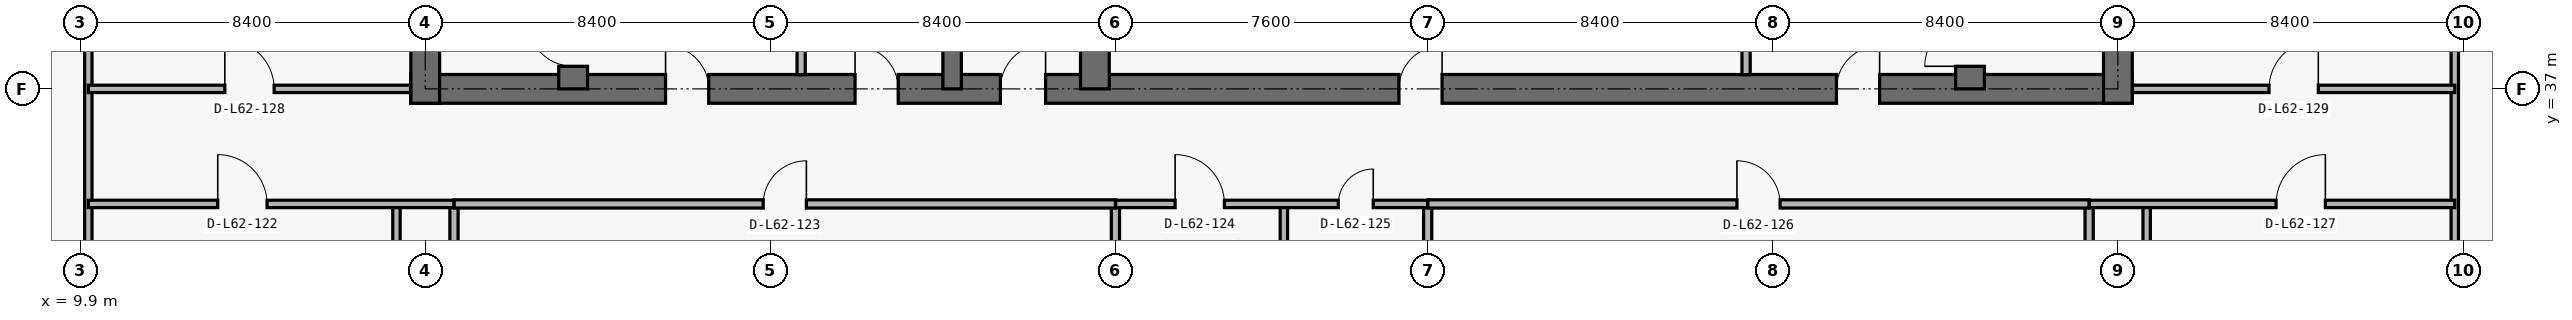
"""IFC4 building model, lengths in metres.
Left out: names, types, materials, properties, quantities, classifications, styles, units other than length and angle.
Written with IfcOpenShell. Run it as: python <this file> out.ifc"""

import sys

from ifc_helpers import new_model, si_unit, direction, frame, frame_2d, origin, place, context, subcontext, project, spatial, rectangle, extrude, element, fill, save


model = new_model("IFC4")
c1 = context("Model", 3, precision=1e-05, world=origin(), true_north=direction((0.0, 1.0)))
c2 = subcontext(c1, "Body", "Model", "MODEL_VIEW")
j1 = project(units=[si_unit("LENGTHUNIT", "METRE"), si_unit("PLANEANGLEUNIT", "RADIAN")], contexts=[c1])
p1 = place(None, origin())
s1 = spatial("IfcSite", under=j1, at=p1, CompositionType="ELEMENT")
p2 = place(p1, origin())
s2 = spatial("IfcBuilding", under=s1, at=p2, CompositionType="ELEMENT")
p3 = place(p2, frame((0.0, 0.0, 221.4)))
s3 = spatial("IfcBuildingStorey", under=s2, at=p3, CompositionType="ELEMENT", Elevation=221.4)
p4 = place(p3, frame((17.95, 37.0, 0.0), z_axis=(0.0, 0.0, 1.0), x_axis=(1.0, 0.0, 0.0)))
e1 = element("IfcWall", 1, at=p4, inside=s3, PredefinedType="SHEAR", context=c2, shape_type="SweptSolid", body=[
    extrude(rectangle(XDim=41.9, YDim=0.7, at=frame_2d((20.95, 0.0))), origin(), (0.0, 0.0, 1.0), 4.85),
])
p5 = place(p4, frame((14.35, 0.0, 0.0)))
e2 = element("IfcOpeningElement", 2, at=p5, cuts=e1, PredefinedType="OPENING", context=c2, shape_type="SweptSolid", body=[
    extrude(rectangle(XDim=1.1, YDim=2.15, at=frame_2d((0.55, 1.075))), frame((0.0, 0.36, 0.0), z_axis=(0.0, -1.0, 0.0), x_axis=(1.0, 0.0, 0.0)), (0.0, 0.0, 1.0), 0.72),
])
p6 = place(p4, frame((6.2, 0.0, 0.0)))
e3 = element("IfcOpeningElement", 3, at=p6, cuts=e1, PredefinedType="OPENING", context=c2, shape_type="SweptSolid", body=[
    extrude(rectangle(XDim=1.05, YDim=2.15, at=frame_2d((0.525, 1.075))), frame((0.0, 0.36, 0.0), z_axis=(0.0, -1.0, 0.0), x_axis=(1.0, 0.0, 0.0)), (0.0, 0.0, 1.0), 0.72),
])
p7 = place(p4, frame((34.7, 0.0, 0.0)))
e4 = element("IfcOpeningElement", 4, at=p7, cuts=e1, PredefinedType="OPENING", context=c2, shape_type="SweptSolid", body=[
    extrude(rectangle(XDim=1.05, YDim=2.15, at=frame_2d((0.525, 1.075))), frame((0.0, 0.36, 0.0), z_axis=(0.0, -1.0, 0.0), x_axis=(1.0, 0.0, 0.0)), (0.0, 0.0, 1.0), 0.72),
])
p8 = place(p4, frame((10.812, 0.0, 0.0)))
e5 = element("IfcOpeningElement", 5, at=p8, cuts=e1, PredefinedType="OPENING", context=c2, shape_type="SweptSolid", body=[
    extrude(rectangle(XDim=1.05, YDim=2.15, at=frame_2d((0.525, 1.075))), frame((0.0, 0.36, 0.0), z_axis=(0.0, -1.0, 0.0), x_axis=(1.0, 0.0, 0.0)), (0.0, 0.0, 1.0), 0.72),
])
p9 = place(p4, frame((24.05, 0.0, 0.0)))
e6 = element("IfcOpeningElement", 6, at=p9, cuts=e1, PredefinedType="OPENING", context=c2, shape_type="SweptSolid", body=[
    extrude(rectangle(XDim=1.05, YDim=2.15, at=frame_2d((0.525, 1.075))), frame((0.0, 0.36, 0.0), z_axis=(0.0, -1.0, 0.0), x_axis=(1.0, 0.0, 0.0)), (0.0, 0.0, 1.0), 0.72),
])
for number, where, z_axis, x_axis in (
    (7, (18.3, 36.65, 0.0), (0.0, 0.0, 1.0), (0.0, 1.0, 0.0)),
    (8, (59.5, 36.65, 0.0), (0.0, 0.0, 1.0), (0.0, 1.0, 0.0)),
):
    element("IfcWall", number, at=place(p3, frame(where, z_axis=z_axis, x_axis=x_axis)), inside=s3, PredefinedType="SHEAR", context=c2, shape_type="SweptSolid", body=[
        extrude(rectangle(XDim=13.95, YDim=0.7, at=frame_2d((6.975, 0.0))), origin(), (0.0, 0.0, 1.0), 4.85),
    ])
p10 = place(p3, frame((21.9, 37.0, 0.0), z_axis=(0.0, 0.0, 1.0), x_axis=(0.0, 1.0, 0.0)))
e9 = element("IfcWall", 9, at=p10, inside=s3, PredefinedType="SHEAR", context=c2, shape_type="SweptSolid", body=[
    extrude(rectangle(XDim=9.575, YDim=0.7, at=frame_2d((4.788, 0.0))), origin(), (0.0, 0.0, 1.0), 4.85),
])
p11 = place(p10, frame((0.55, 0.0, 0.0)))
e10 = element("IfcOpeningElement", 10, at=p11, cuts=e9, PredefinedType="OPENING", context=c2, shape_type="SweptSolid", body=[
    extrude(rectangle(XDim=1.1, YDim=2.15, at=frame_2d((0.55, 1.075))), frame((0.0, 0.36, 0.0), z_axis=(0.0, -1.0, 0.0), x_axis=(1.0, 0.0, 0.0)), (0.0, 0.0, 1.0), 0.72),
])
p12 = place(p3, frame((55.9, 37.0, 0.0), z_axis=(0.0, 0.0, 1.0), x_axis=(0.0, 1.0, 0.0)))
e11 = element("IfcWall", 11, at=p12, inside=s3, PredefinedType="SHEAR", context=c2, shape_type="SweptSolid", body=[
    extrude(rectangle(XDim=9.575, YDim=0.7, at=frame_2d((4.788, 0.0))), origin(), (0.0, 0.0, 1.0), 4.85),
])
p13 = place(p12, frame((0.55, 0.0, 0.0)))
e12 = element("IfcOpeningElement", 12, at=p13, cuts=e11, PredefinedType="OPENING", context=c2, shape_type="SweptSolid", body=[
    extrude(rectangle(XDim=1.1, YDim=2.15, at=frame_2d((0.55, 1.075))), frame((0.0, 0.36, 0.0), z_axis=(0.0, -1.0, 0.0), x_axis=(1.0, 0.0, 0.0)), (0.0, 0.0, 1.0), 0.72),
])
p14 = place(p3, frame((31.125, 37.0, 0.0), z_axis=(0.0, 0.0, 1.0), x_axis=(0.0, 1.0, 0.0)))
e13 = element("IfcWall", 13, at=p14, inside=s3, PredefinedType="SHEAR", context=c2, shape_type="SweptSolid", body=[
    extrude(rectangle(XDim=9.575, YDim=0.45, at=frame_2d((4.788, 0.0))), origin(), (0.0, 0.0, 1.0), 4.85),
])
p15 = place(p3, frame((34.6, 37.0, 0.0), z_axis=(0.0, 0.0, 1.0), x_axis=(0.0, 1.0, 0.0)))
e14 = element("IfcWall", 14, at=p15, inside=s3, PredefinedType="SHEAR", context=c2, shape_type="SweptSolid", body=[
    extrude(rectangle(XDim=9.575, YDim=0.7, at=frame_2d((4.788, 0.0))), origin(), (0.0, 0.0, 1.0), 4.85),
])
p16 = place(p3, frame((10.1, 12.9, 0.0), z_axis=(0.0, 0.0, 1.0), x_axis=(0.0, 1.0, 0.0)))
e15 = element("IfcWall", 15, at=p16, inside=s3, PredefinedType="PARTITIONING", context=c2, shape_type="SweptSolid", body=[
    extrude(rectangle(XDim=33.98, YDim=0.18, at=frame_2d((16.99, 0.0))), origin(), (0.0, 0.0, 1.0), 3.814),
])
p17 = place(p3, frame((17.6, 12.9, 0.0), z_axis=(0.0, 0.0, 1.0), x_axis=(0.0, 1.0, 0.0)))
e16 = element("IfcWall", 16, at=p17, inside=s3, PredefinedType="PARTITIONING", context=c2, shape_type="SweptSolid", body=[
    extrude(rectangle(XDim=21.3, YDim=0.18, at=frame_2d((10.65, 0.0))), origin(), (0.0, 0.0, 1.0), 4.85),
])
p18 = place(p3, frame((19.0, 12.9, 0.0), z_axis=(0.0, 0.0, 1.0), x_axis=(0.0, 1.0, 0.0)))
e17 = element("IfcWall", 17, at=p18, inside=s3, PredefinedType="PARTITIONING", context=c2, shape_type="SweptSolid", body=[
    extrude(rectangle(XDim=21.3, YDim=0.2, at=frame_2d((10.65, 0.0))), origin(), (0.0, 0.0, 1.0), 4.85),
])
p19 = place(p3, frame((27.45, 37.345, 0.0), z_axis=(0.0, 0.0, 1.0), x_axis=(0.0, 1.0, 0.0)))
e18 = element("IfcWall", 18, at=p19, inside=s3, PredefinedType="PARTITIONING", context=c2, shape_type="SweptSolid", body=[
    extrude(rectangle(XDim=5.385, YDim=0.2, at=frame_2d((2.692, 0.0))), origin(), (0.0, 0.0, 1.0), 4.85),
])
p20 = place(p3, frame((35.1, 12.9, 0.0), z_axis=(0.0, 0.0, 1.0), x_axis=(0.0, 1.0, 0.0)))
e19 = element("IfcWall", 19, at=p20, inside=s3, PredefinedType="PARTITIONING", context=c2, shape_type="SweptSolid", body=[
    extrude(rectangle(XDim=21.3, YDim=0.2, at=frame_2d((10.65, 0.0))), origin(), (0.0, 0.0, 1.0), 3.814),
])
p21 = place(p3, frame((39.2, 29.4, 0.0), z_axis=(0.0, 0.0, 1.0), x_axis=(0.0, 1.0, 0.0)))
e20 = element("IfcWall", 20, at=p21, inside=s3, PredefinedType="PARTITIONING", context=c2, shape_type="SweptSolid", body=[
    extrude(rectangle(XDim=4.8, YDim=0.18, at=frame_2d((2.4, 0.0))), origin(), (0.0, 0.0, 1.0), 4.85),
])
p22 = place(p3, frame((42.7, 12.9, 0.0), z_axis=(0.0, 0.0, 1.0), x_axis=(0.0, 1.0, 0.0)))
e21 = element("IfcWall", 21, at=p22, inside=s3, PredefinedType="PARTITIONING", context=c2, shape_type="SweptSolid", body=[
    extrude(rectangle(XDim=21.3, YDim=0.2, at=frame_2d((10.65, 0.0))), origin(), (0.0, 0.0, 1.0), 3.814),
])
p23 = place(p3, frame((50.45, 37.345, 0.0), z_axis=(0.0, 0.0, 1.0), x_axis=(0.0, 1.0, 0.0)))
e22 = element("IfcWall", 22, at=p23, inside=s3, PredefinedType="PARTITIONING", context=c2, shape_type="SweptSolid", body=[
    extrude(rectangle(XDim=5.385, YDim=0.2, at=frame_2d((2.692, 0.0))), origin(), (0.0, 0.0, 1.0), 4.85),
])
p24 = place(p3, frame((58.8, 12.9, 0.0), z_axis=(0.0, 0.0, 1.0), x_axis=(0.0, 1.0, 0.0)))
e23 = element("IfcWall", 23, at=p24, inside=s3, PredefinedType="PARTITIONING", context=c2, shape_type="SweptSolid", body=[
    extrude(rectangle(XDim=21.3, YDim=0.2, at=frame_2d((10.65, 0.0))), origin(), (0.0, 0.0, 1.0), 4.85),
])
p25 = place(p3, frame((60.2, 12.9, 0.0), z_axis=(0.0, 0.0, 1.0), x_axis=(0.0, 1.0, 0.0)))
e24 = element("IfcWall", 24, at=p25, inside=s3, PredefinedType="PARTITIONING", context=c2, shape_type="SweptSolid", body=[
    extrude(rectangle(XDim=21.3, YDim=0.18, at=frame_2d((10.65, 0.0))), origin(), (0.0, 0.0, 1.0), 4.85),
])
p26 = place(p3, frame((67.7, 12.9, 0.0), z_axis=(0.0, 0.0, 1.0), x_axis=(0.0, 1.0, 0.0)))
e25 = element("IfcWall", 25, at=p26, inside=s3, PredefinedType="PARTITIONING", context=c2, shape_type="SweptSolid", body=[
    extrude(rectangle(XDim=33.98, YDim=0.18, at=frame_2d((16.99, 0.0))), origin(), (0.0, 0.0, 1.0), 3.814),
])
p27 = place(p3, frame((10.1, 34.2, 0.0), z_axis=(0.0, 0.0, 1.0), x_axis=(1.0, 0.0, 0.0)))
e26 = element("IfcWall", 26, at=p27, inside=s3, PredefinedType="PARTITIONING", context=c2, shape_type="SweptSolid", body=[
    extrude(rectangle(XDim=8.9, YDim=0.18, at=frame_2d((4.45, 0.0))), origin(), (0.0, 0.0, 1.0), 4.85),
])
p28 = place(p27, frame((3.15, 0.0, 0.0)))
e27 = element("IfcOpeningElement", 27, at=p28, cuts=e26, PredefinedType="OPENING", context=c2, shape_type="SweptSolid", body=[
    extrude(rectangle(XDim=1.2, YDim=2.2, at=frame_2d((0.6, 1.1))), frame((0.0, 0.1, 0.0), z_axis=(0.0, -1.0, 0.0), x_axis=(1.0, 0.0, 0.0)), (0.0, 0.0, 1.0), 0.2),
])
p29 = place(p3, frame((19.005, 34.2, 0.0), z_axis=(0.0, 0.0, 1.0), x_axis=(1.0, 0.0, 0.0)))
e28 = element("IfcWall", 28, at=p29, inside=s3, PredefinedType="PARTITIONING", context=c2, shape_type="SweptSolid", body=[
    extrude(rectangle(XDim=16.095, YDim=0.2, at=frame_2d((8.048, 0.0))), origin(), (0.0, 0.0, 1.0), 4.85),
])
p30 = place(p29, frame((7.522, 0.0, 0.0)))
e29 = element("IfcOpeningElement", 29, at=p30, cuts=e28, PredefinedType="OPENING", context=c2, shape_type="SweptSolid", body=[
    extrude(rectangle(XDim=1.05, YDim=2.15, at=frame_2d((0.525, 1.075))), frame((0.0, 0.11, 0.0), z_axis=(0.0, -1.0, 0.0), x_axis=(1.0, 0.0, 0.0)), (0.0, 0.0, 1.0), 0.22),
])
p31 = place(p3, frame((35.105, 34.2, 0.0), z_axis=(0.0, 0.0, 1.0), x_axis=(1.0, 0.0, 0.0)))
e30 = element("IfcWall", 30, at=p31, inside=s3, PredefinedType="PARTITIONING", context=c2, shape_type="SweptSolid", body=[
    extrude(rectangle(XDim=7.595, YDim=0.18, at=frame_2d((3.797, 0.0))), origin(), (0.0, 0.0, 1.0), 4.85),
])
p32 = place(p31, frame((1.448, 0.0, 0.0)))
e31 = element("IfcOpeningElement", 31, at=p32, cuts=e30, PredefinedType="OPENING", context=c2, shape_type="SweptSolid", body=[
    extrude(rectangle(XDim=1.2, YDim=2.2, at=frame_2d((0.6, 1.1))), frame((0.0, 0.1, 0.0), z_axis=(0.0, -1.0, 0.0), x_axis=(1.0, 0.0, 0.0)), (0.0, 0.0, 1.0), 0.2),
])
p33 = place(p31, frame((5.42, 0.0, 0.0)))
e32 = element("IfcOpeningElement", 32, at=p33, cuts=e30, PredefinedType="OPENING", context=c2, shape_type="SweptSolid", body=[
    extrude(rectangle(XDim=0.85, YDim=2.1, at=frame_2d((0.425, 1.05))), frame((0.0, 0.1, 0.0), z_axis=(0.0, -1.0, 0.0), x_axis=(1.0, 0.0, 0.0)), (0.0, 0.0, 1.0), 0.2),
])
p34 = place(p3, frame((42.705, 34.2, 0.0), z_axis=(0.0, 0.0, 1.0), x_axis=(1.0, 0.0, 0.0)))
e33 = element("IfcWall", 33, at=p34, inside=s3, PredefinedType="PARTITIONING", context=c2, shape_type="SweptSolid", body=[
    extrude(rectangle(XDim=16.095, YDim=0.2, at=frame_2d((8.047, 0.0))), origin(), (0.0, 0.0, 1.0), 4.85),
])
p35 = place(p34, frame((7.522, 0.0, 0.0)))
e34 = element("IfcOpeningElement", 34, at=p35, cuts=e33, PredefinedType="OPENING", context=c2, shape_type="SweptSolid", body=[
    extrude(rectangle(XDim=1.05, YDim=2.15, at=frame_2d((0.525, 1.075))), frame((0.0, 0.11, 0.0), z_axis=(0.0, -1.0, 0.0), x_axis=(1.0, 0.0, 0.0)), (0.0, 0.0, 1.0), 0.22),
])
p36 = place(p3, frame((58.805, 34.2, 0.0), z_axis=(0.0, 0.0, 1.0), x_axis=(1.0, 0.0, 0.0)))
e35 = element("IfcWall", 35, at=p36, inside=s3, PredefinedType="PARTITIONING", context=c2, shape_type="SweptSolid", body=[
    extrude(rectangle(XDim=8.895, YDim=0.18, at=frame_2d((4.448, 0.0))), origin(), (0.0, 0.0, 1.0), 4.85),
])
p37 = place(p36, frame((4.545, 0.0, 0.0)))
e36 = element("IfcOpeningElement", 36, at=p37, cuts=e35, PredefinedType="OPENING", context=c2, shape_type="SweptSolid", body=[
    extrude(rectangle(XDim=1.2, YDim=2.2, at=frame_2d((0.6, 1.1))), frame((0.0, 0.1, 0.0), z_axis=(0.0, -1.0, 0.0), x_axis=(1.0, 0.0, 0.0)), (0.0, 0.0, 1.0), 0.2),
])
p38 = place(p3, frame((10.1, 37.0, 0.0), z_axis=(0.0, 0.0, 1.0), x_axis=(1.0, 0.0, 0.0)))
e37 = element("IfcWall", 37, at=p38, inside=s3, PredefinedType="PARTITIONING", context=c2, shape_type="SweptSolid", body=[
    extrude(rectangle(XDim=7.845, YDim=0.18, at=frame_2d((3.922, 0.0))), origin(), (0.0, 0.0, 1.0), 4.85),
])
p39 = place(p38, frame((3.323, 0.0, 0.0)))
e38 = element("IfcOpeningElement", 38, at=p39, cuts=e37, PredefinedType="OPENING", context=c2, shape_type="SweptSolid", body=[
    extrude(rectangle(XDim=1.2, YDim=2.2, at=frame_2d((0.6, 1.1))), frame((0.0, 0.1, 0.0), z_axis=(0.0, -1.0, 0.0), x_axis=(1.0, 0.0, 0.0)), (0.0, 0.0, 1.0), 0.2),
])
p40 = place(p3, frame((59.855, 37.0, 0.0), z_axis=(0.0, 0.0, 1.0), x_axis=(1.0, 0.0, 0.0)))
e39 = element("IfcWall", 39, at=p40, inside=s3, PredefinedType="PARTITIONING", context=c2, shape_type="SweptSolid", body=[
    extrude(rectangle(XDim=7.845, YDim=0.18, at=frame_2d((3.922, 0.0))), origin(), (0.0, 0.0, 1.0), 4.85),
])
p41 = place(p40, frame((3.323, 0.0, 0.0)))
e40 = element("IfcOpeningElement", 40, at=p41, cuts=e39, PredefinedType="OPENING", context=c2, shape_type="SweptSolid", body=[
    extrude(rectangle(XDim=1.2, YDim=2.2, at=frame_2d((0.6, 1.1))), frame((0.0, 0.1, 0.0), z_axis=(0.0, -1.0, 0.0), x_axis=(1.0, 0.0, 0.0)), (0.0, 0.0, 1.0), 0.2),
])
p42 = place(p5, origin())
e41 = element("IfcDoor", 41, at=p42, inside=s3, OperationType="SINGLE_SWING_RIGHT", PredefinedType="DOOR", context=c2, shape_type="SweptSolid", body=[
    extrude(rectangle(XDim=1.1, YDim=2.15, at=frame_2d((0.55, 1.075))), frame((0.0, 0.025, 0.0), z_axis=(0.0, -1.0, 0.0), x_axis=(1.0, 0.0, 0.0)), (0.0, 0.0, 1.0), 0.05),
])
fill(e2, e41)
p43 = place(p6, origin())
e42 = element("IfcDoor", 42, at=p43, inside=s3, OperationType="SINGLE_SWING_LEFT", PredefinedType="DOOR", context=c2, shape_type="SweptSolid", body=[
    extrude(rectangle(XDim=1.05, YDim=2.15, at=frame_2d((0.525, 1.075))), frame((0.0, 0.025, 0.0), z_axis=(0.0, -1.0, 0.0), x_axis=(1.0, 0.0, 0.0)), (0.0, 0.0, 1.0), 0.05),
])
fill(e3, e42)
p44 = place(p11, origin())
e43 = element("IfcDoor", 43, at=p44, inside=s3, OperationType="SINGLE_SWING_RIGHT", PredefinedType="DOOR", context=c2, shape_type="SweptSolid", body=[
    extrude(rectangle(XDim=1.1, YDim=2.15, at=frame_2d((0.55, 1.075))), frame((0.0, 0.025, 0.0), z_axis=(0.0, -1.0, 0.0), x_axis=(1.0, 0.0, 0.0)), (0.0, 0.0, 1.0), 0.05),
])
fill(e10, e43)
p45 = place(p7, origin())
e44 = element("IfcDoor", 44, at=p45, inside=s3, OperationType="SINGLE_SWING_RIGHT", PredefinedType="DOOR", context=c2, shape_type="SweptSolid", body=[
    extrude(rectangle(XDim=1.05, YDim=2.15, at=frame_2d((0.525, 1.075))), frame((0.0, 0.025, 0.0), z_axis=(0.0, -1.0, 0.0), x_axis=(1.0, 0.0, 0.0)), (0.0, 0.0, 1.0), 0.05),
])
fill(e4, e44)
p46 = place(p13, origin())
e45 = element("IfcDoor", 45, at=p46, inside=s3, OperationType="SINGLE_SWING_LEFT", PredefinedType="DOOR", context=c2, shape_type="SweptSolid", body=[
    extrude(rectangle(XDim=1.1, YDim=2.15, at=frame_2d((0.55, 1.075))), frame((0.0, 0.025, 0.0), z_axis=(0.0, -1.0, 0.0), x_axis=(1.0, 0.0, 0.0)), (0.0, 0.0, 1.0), 0.05),
])
fill(e12, e45)
p47 = place(p8, origin())
e46 = element("IfcDoor", 46, at=p47, inside=s3, OperationType="SINGLE_SWING_LEFT", PredefinedType="DOOR", context=c2, shape_type="SweptSolid", body=[
    extrude(rectangle(XDim=1.05, YDim=2.15, at=frame_2d((0.525, 1.075))), frame((0.0, 0.025, 0.0), z_axis=(0.0, -1.0, 0.0), x_axis=(1.0, 0.0, 0.0)), (0.0, 0.0, 1.0), 0.05),
])
fill(e5, e46)
p48 = place(p9, origin())
e47 = element("IfcDoor", 47, at=p48, inside=s3, OperationType="SINGLE_SWING_RIGHT", PredefinedType="DOOR", context=c2, shape_type="SweptSolid", body=[
    extrude(rectangle(XDim=1.05, YDim=2.15, at=frame_2d((0.525, 1.075))), frame((0.0, 0.025, 0.0), z_axis=(0.0, -1.0, 0.0), x_axis=(1.0, 0.0, 0.0)), (0.0, 0.0, 1.0), 0.05),
])
fill(e6, e47)
p49 = place(p28, origin())
e48 = element("IfcDoor", 48, at=p49, inside=s3, OperationType="SINGLE_SWING_LEFT", PredefinedType="DOOR", context=c2, shape_type="SweptSolid", body=[
    extrude(rectangle(XDim=1.2, YDim=2.2, at=frame_2d((0.6, 1.1))), frame((0.0, 0.025, 0.0), z_axis=(0.0, -1.0, 0.0), x_axis=(1.0, 0.0, 0.0)), (0.0, 0.0, 1.0), 0.05),
])
fill(e27, e48)
p50 = place(p30, origin())
e49 = element("IfcDoor", 49, at=p50, inside=s3, OperationType="SINGLE_SWING_RIGHT", PredefinedType="DOOR", context=c2, shape_type="SweptSolid", body=[
    extrude(rectangle(XDim=1.05, YDim=2.15, at=frame_2d((0.525, 1.075))), frame((0.0, 0.025, 0.0), z_axis=(0.0, -1.0, 0.0), x_axis=(1.0, 0.0, 0.0)), (0.0, 0.0, 1.0), 0.05),
])
fill(e29, e49)
p51 = place(p32, origin())
e50 = element("IfcDoor", 50, at=p51, inside=s3, OperationType="SINGLE_SWING_LEFT", PredefinedType="DOOR", context=c2, shape_type="SweptSolid", body=[
    extrude(rectangle(XDim=1.2, YDim=2.2, at=frame_2d((0.6, 1.1))), frame((0.0, 0.025, 0.0), z_axis=(0.0, -1.0, 0.0), x_axis=(1.0, 0.0, 0.0)), (0.0, 0.0, 1.0), 0.05),
])
fill(e31, e50)
p52 = place(p33, origin())
e51 = element("IfcDoor", 51, at=p52, inside=s3, OperationType="SINGLE_SWING_RIGHT", PredefinedType="DOOR", context=c2, shape_type="SweptSolid", body=[
    extrude(rectangle(XDim=0.85, YDim=2.1, at=frame_2d((0.425, 1.05))), frame((0.0, 0.025, 0.0), z_axis=(0.0, -1.0, 0.0), x_axis=(1.0, 0.0, 0.0)), (0.0, 0.0, 1.0), 0.05),
])
fill(e32, e51)
p53 = place(p35, origin())
e52 = element("IfcDoor", 52, at=p53, inside=s3, OperationType="SINGLE_SWING_LEFT", PredefinedType="DOOR", context=c2, shape_type="SweptSolid", body=[
    extrude(rectangle(XDim=1.05, YDim=2.15, at=frame_2d((0.525, 1.075))), frame((0.0, 0.025, 0.0), z_axis=(0.0, -1.0, 0.0), x_axis=(1.0, 0.0, 0.0)), (0.0, 0.0, 1.0), 0.05),
])
fill(e34, e52)
p54 = place(p37, origin())
e53 = element("IfcDoor", 53, at=p54, inside=s3, OperationType="SINGLE_SWING_RIGHT", PredefinedType="DOOR", context=c2, shape_type="SweptSolid", body=[
    extrude(rectangle(XDim=1.2, YDim=2.2, at=frame_2d((0.6, 1.1))), frame((0.0, 0.025, 0.0), z_axis=(0.0, -1.0, 0.0), x_axis=(1.0, 0.0, 0.0)), (0.0, 0.0, 1.0), 0.05),
])
fill(e36, e53)
p55 = place(p39, origin())
e54 = element("IfcDoor", 54, at=p55, inside=s3, OperationType="SINGLE_SWING_LEFT", PredefinedType="DOOR", context=c2, shape_type="SweptSolid", body=[
    extrude(rectangle(XDim=1.2, YDim=2.2, at=frame_2d((0.6, 1.1))), frame((0.0, 0.025, 0.0), z_axis=(0.0, -1.0, 0.0), x_axis=(1.0, 0.0, 0.0)), (0.0, 0.0, 1.0), 0.05),
])
fill(e38, e54)
p56 = place(p41, origin())
e55 = element("IfcDoor", 55, at=p56, inside=s3, OperationType="SINGLE_SWING_RIGHT", PredefinedType="DOOR", context=c2, shape_type="SweptSolid", body=[
    extrude(rectangle(XDim=1.2, YDim=2.2, at=frame_2d((0.6, 1.1))), frame((0.0, 0.025, 0.0), z_axis=(0.0, -1.0, 0.0), x_axis=(1.0, 0.0, 0.0)), (0.0, 0.0, 1.0), 0.05),
])
fill(e40, e55)
save(model, sys.argv[1])
